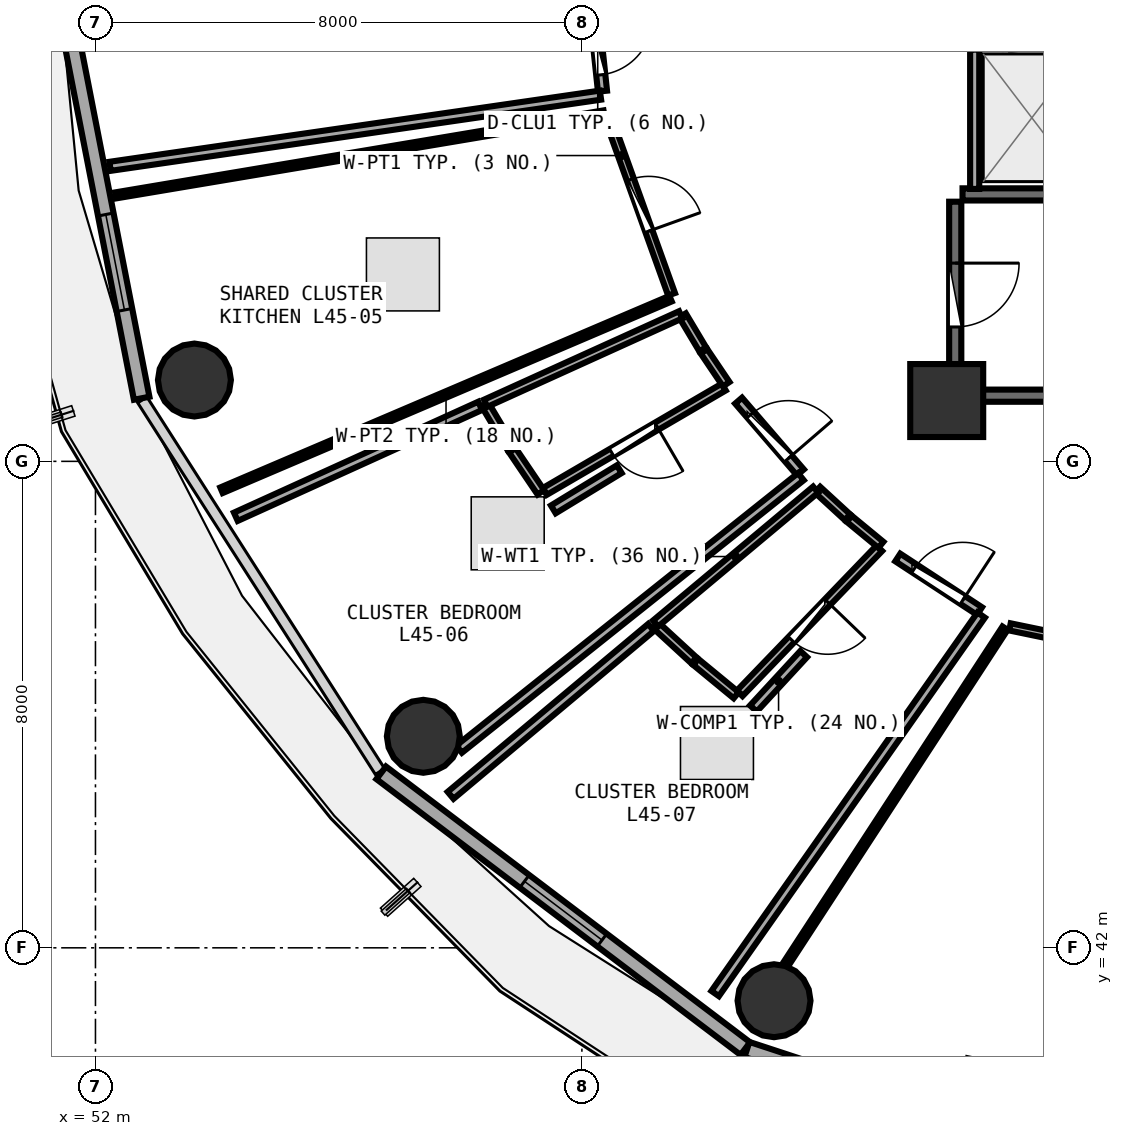
"""IFC4 building model, lengths in metres.
Left out: names, types, materials, properties, quantities, classifications, styles, units other than length and angle.
Written with IfcOpenShell. Run it as: python <this file> out.ifc"""

import sys

from ifc_helpers import new_model, si_unit, direction, frame, frame_2d, origin, origin_2d, place, context, subcontext, project, spatial, rectangle, circle, extrude, element, fill, save


model = new_model("IFC4")
c1 = context("Model", 3, precision=1e-05, world=origin(), true_north=direction((0.0, 1.0)))
c2 = subcontext(c1, "Body", "Model", "MODEL_VIEW")
j1 = project(units=[si_unit("LENGTHUNIT", "METRE"), si_unit("PLANEANGLEUNIT", "RADIAN")], contexts=[c1])
p1 = place(None, origin())
s1 = spatial("IfcSite", under=j1, at=p1, CompositionType="ELEMENT")
p2 = place(p1, origin())
s2 = spatial("IfcBuilding", under=s1, at=p2, CompositionType="ELEMENT")
p3 = place(p2, frame((0.0, 0.0, 176.85)))
s3 = spatial("IfcBuildingStorey", under=s2, at=p3, CompositionType="ELEMENT", Elevation=176.85)
p4 = place(p3, frame((66.0, 51.0, 0.0), z_axis=(0.0, 0.0, 1.0), x_axis=(1.0, 0.0, 0.0)))
e1 = element("IfcColumn", 1, at=p4, inside=s3, PredefinedType="PILASTER", context=c2, shape_type="SweptSolid", body=[
    extrude(rectangle(XDim=1.2, YDim=1.2, at=origin_2d()), origin(), (0.0, 0.0, 1.0), 3.75),
])
for number, where, z_axis, x_axis in (
    (2, (53.627, 51.337, 0.0), (0.0, 0.0, 1.0), (1.0, 0.0, 0.0)),
    (3, (57.392, 45.479, 0.0), (0.0, 0.0, 1.0), (1.0, 0.0, 0.0)),
    (4, (63.16, 41.13, 0.0), (0.0, 0.0, 1.0), (1.0, 0.0, 0.0)),
):
    element("IfcColumn", number, at=place(p3, frame(where, z_axis=z_axis, x_axis=x_axis)), inside=s3, PredefinedType="COLUMN", context=c2, shape_type="SweptSolid", body=[
        extrude(circle(Radius=0.6, at=origin_2d()), origin(), (0.0, 0.0, 1.0), 3.75),
    ])
p5 = place(p3, frame((51.403, 57.985, 0.0), z_axis=(0.0, 0.0, 1.0), x_axis=(0.191716984769, -0.981450252306, 0.0)))
e5 = element("IfcWall", 5, at=p5, inside=s3, PredefinedType="SOLIDWALL", context=c2, shape_type="SweptSolid", body=[
    extrude(rectangle(XDim=7.079, YDim=0.26, at=frame_2d((3.54, 0.0))), origin(), (0.0, 0.0, 1.0), 3.475),
])
p6 = place(p5, frame((4.0, 0.0, 0.85)))
e6 = element("IfcOpeningElement", 6, at=p6, cuts=e5, PredefinedType="OPENING", context=c2, shape_type="SweptSolid", body=[
    extrude(rectangle(XDim=1.6, YDim=1.45, at=frame_2d((0.8, 0.725))), frame((0.0, 0.14, 0.0), z_axis=(0.0, -1.0, 0.0), x_axis=(1.0, 0.0, 0.0)), (0.0, 0.0, 1.0), 0.28),
])
p7 = place(p3, frame((56.699, 44.878, 0.0), z_axis=(0.0, 0.0, 1.0), x_axis=(0.797163719609, -0.603763202042, 0.0)))
e7 = element("IfcWall", 7, at=p7, inside=s3, PredefinedType="SOLIDWALL", context=c2, shape_type="SweptSolid", body=[
    extrude(rectangle(XDim=7.512, YDim=0.26, at=frame_2d((3.756, 0.0))), origin(), (0.0, 0.0, 1.0), 3.475),
])
p8 = place(p7, frame((2.956, 0.0, 0.85)))
e8 = element("IfcOpeningElement", 8, at=p8, cuts=e7, PredefinedType="OPENING", context=c2, shape_type="SweptSolid", body=[
    extrude(rectangle(XDim=1.6, YDim=1.45, at=frame_2d((0.8, 0.725))), frame((0.0, 0.14, 0.0), z_axis=(0.0, -1.0, 0.0), x_axis=(1.0, 0.0, 0.0)), (0.0, 0.0, 1.0), 0.28),
])
p9 = place(p3, frame((62.714, 40.328, 0.0), z_axis=(0.0, 0.0, 1.0), x_axis=(0.950038302428, -0.312133343173, 0.0)))
e9 = element("IfcWall", 9, at=p9, inside=s3, PredefinedType="SOLIDWALL", context=c2, shape_type="SweptSolid", body=[
    extrude(rectangle(XDim=7.733, YDim=0.26, at=frame_2d((3.867, 0.0))), origin(), (0.0, 0.0, 1.0), 3.475),
])
p10 = place(p9, frame((3.067, 0.0, 0.85)))
e10 = element("IfcOpeningElement", 10, at=p10, cuts=e9, PredefinedType="OPENING", context=c2, shape_type="SweptSolid", body=[
    extrude(rectangle(XDim=1.6, YDim=1.45, at=frame_2d((0.8, 0.725))), frame((0.0, 0.14, 0.0), z_axis=(0.0, -1.0, 0.0), x_axis=(1.0, 0.0, 0.0)), (0.0, 0.0, 1.0), 0.28),
])
for number, where, z_axis, x_axis in (
    (11, (66.26, 51.08, 0.0), (0.0, 0.0, 1.0), (1.0, 0.0, 0.0)),
    (12, (73.42, 54.39, 0.0), (0.0, 0.0, 1.0), (-1.0, 0.0, 0.0)),
):
    element("IfcWall", number, at=place(p3, frame(where, z_axis=z_axis, x_axis=x_axis)), inside=s3, PredefinedType="SHEAR", context=c2, shape_type="SweptSolid", body=[
        extrude(rectangle(XDim=7.16, YDim=0.2, at=frame_2d((3.58, 0.0))), origin(), (0.0, 0.0, 1.0), 3.49),
    ])
p11 = place(p3, frame((66.14, 54.27, 0.0), z_axis=(0.0, 0.0, 1.0), x_axis=(0.0, -1.0, 0.0)))
e13 = element("IfcWall", 13, at=p11, inside=s3, PredefinedType="SHEAR", context=c2, shape_type="SweptSolid", body=[
    extrude(rectangle(XDim=3.07, YDim=0.2, at=frame_2d((1.535, 0.0))), origin(), (0.0, 0.0, 1.0), 3.49),
])
p12 = place(p11, frame((1.01, 0.0, 0.0)))
e14 = element("IfcOpeningElement", 14, at=p12, cuts=e13, PredefinedType="OPENING", context=c2, shape_type="SweptSolid", body=[
    extrude(rectangle(XDim=1.05, YDim=2.1, at=frame_2d((0.525, 1.05))), frame((0.0, 0.11, 0.0), z_axis=(0.0, -1.0, 0.0), x_axis=(1.0, 0.0, 0.0)), (0.0, 0.0, 1.0), 0.22),
])
p13 = place(p3, frame((66.46, 54.48, 0.0), z_axis=(0.0, 0.0, 1.0), x_axis=(0.0, 1.0, 0.0)))
e15 = element("IfcWall", 15, at=p13, inside=s3, PredefinedType="PARTITIONING", context=c2, shape_type="SweptSolid", body=[
    extrude(rectangle(XDim=2.29, YDim=0.15, at=frame_2d((1.145, 0.0))), origin(), (0.0, 0.0, 1.0), 3.48),
])
p14 = place(p3, frame((67.04, 47.278, 0.0), z_axis=(0.0, 0.0, 1.0), x_axis=(0.979184226645, -0.202973521154, 0.0)))
e16 = element("IfcWall", 16, at=p14, inside=s3, PredefinedType="PARTITIONING", context=c2, shape_type="SweptSolid", body=[
    extrude(rectangle(XDim=8.162, YDim=0.12, at=frame_2d((4.081, 0.0))), origin(), (0.0, 0.0, 1.0), 2.975),
])
p15 = place(p14, frame((3.631, 0.0, 0.0)))
e17 = element("IfcOpeningElement", 17, at=p15, cuts=e16, PredefinedType="OPENING", context=c2, shape_type="SweptSolid", body=[
    extrude(rectangle(XDim=0.9, YDim=2.08, at=frame_2d((0.45, 1.04))), frame((0.0, 0.07, 0.0), z_axis=(0.0, -1.0, 0.0), x_axis=(1.0, 0.0, 0.0)), (0.0, 0.0, 1.0), 0.14),
])
p16 = place(p3, frame((60.182, 57.568, 0.0), z_axis=(0.0, 0.0, 1.0), x_axis=(0.104940843895, -0.994478465972, 0.0)))
e18 = element("IfcWall", 18, at=p16, inside=s3, PredefinedType="PARTITIONING", context=c2, shape_type="SweptSolid", body=[
    extrude(rectangle(XDim=1.489, YDim=0.15, at=frame_2d((0.745, 0.0))), origin(), (0.0, 0.0, 1.0), 3.48),
])
p17 = place(p16, frame((0.269, 0.0, 0.0)))
e19 = element("IfcOpeningElement", 19, at=p17, cuts=e18, PredefinedType="OPENING", context=c2, shape_type="SweptSolid", body=[
    extrude(rectangle(XDim=0.95, YDim=2.08, at=frame_2d((0.475, 1.04))), frame((0.0, 0.085, 0.0), z_axis=(0.0, -1.0, 0.0), x_axis=(1.0, 0.0, 0.0)), (0.0, 0.0, 1.0), 0.17),
])
p18 = place(p3, frame((60.423, 55.673, 0.0), z_axis=(0.0, 0.0, 1.0), x_axis=(0.338221551274, -0.941066513193, 0.0)))
e20 = element("IfcWall", 20, at=p18, inside=s3, PredefinedType="PARTITIONING", context=c2, shape_type="SweptSolid", body=[
    extrude(rectangle(XDim=3.108, YDim=0.12, at=frame_2d((1.554, 0.0))), origin(), (0.0, 0.0, 1.0), 3.235),
])
p19 = place(p18, frame((1.104, 0.0, 0.0)))
e21 = element("IfcOpeningElement", 21, at=p19, cuts=e20, PredefinedType="OPENING", context=c2, shape_type="SweptSolid", body=[
    extrude(rectangle(XDim=0.9, YDim=2.08, at=frame_2d((0.45, 1.04))), frame((0.0, 0.07, 0.0), z_axis=(0.0, -1.0, 0.0), x_axis=(1.0, 0.0, 0.0)), (0.0, 0.0, 1.0), 0.14),
])
p20 = place(p3, frame((62.333, 51.222, 0.0), z_axis=(0.0, 0.0, 1.0), x_axis=(-0.863869779697, -0.503715201008, 0.0)))
e22 = element("IfcWall", 22, at=p20, inside=s3, PredefinedType="PLUMBINGWALL", context=c2, shape_type="SweptSolid", body=[
    extrude(rectangle(XDim=3.41, YDim=0.13, at=frame_2d((1.705, 0.0))), origin(), (0.0, 0.0, 1.0), 2.975),
])
p21 = place(p20, frame((1.275, 0.0, 0.0)))
e23 = element("IfcOpeningElement", 23, at=p21, cuts=e22, PredefinedType="OPENING", context=c2, shape_type="SweptSolid", body=[
    extrude(rectangle(XDim=0.86, YDim=2.05, at=frame_2d((0.43, 1.025))), frame((0.0, 0.075, 0.0), z_axis=(0.0, -1.0, 0.0), x_axis=(1.0, 0.0, 0.0)), (0.0, 0.0, 1.0), 0.15),
])
p22 = place(p3, frame((62.577, 50.999, 0.0), z_axis=(0.0, 0.0, 1.0), x_axis=(0.652725635782, -0.757594379859, 0.0)))
e24 = element("IfcWall", 24, at=p22, inside=s3, PredefinedType="PARTITIONING", context=c2, shape_type="SweptSolid", body=[
    extrude(rectangle(XDim=1.557, YDim=0.15, at=frame_2d((0.779, 0.0))), origin(), (0.0, 0.0, 1.0), 2.975),
])
p23 = place(p22, frame((0.304, 0.0, 0.0)))
e25 = element("IfcOpeningElement", 25, at=p23, cuts=e24, PredefinedType="OPENING", context=c2, shape_type="SweptSolid", body=[
    extrude(rectangle(XDim=0.95, YDim=2.08, at=frame_2d((0.475, 1.04))), frame((0.0, 0.085, 0.0), z_axis=(0.0, -1.0, 0.0), x_axis=(1.0, 0.0, 0.0)), (0.0, 0.0, 1.0), 0.17),
])
p24 = place(p3, frame((64.891, 48.571, 0.0), z_axis=(0.0, 0.0, 1.0), x_axis=(-0.69341503006, -0.720538407086, 0.0)))
e26 = element("IfcWall", 26, at=p24, inside=s3, PredefinedType="PLUMBINGWALL", context=c2, shape_type="SweptSolid", body=[
    extrude(rectangle(XDim=3.312, YDim=0.13, at=frame_2d((1.656, 0.0))), origin(), (0.0, 0.0, 1.0), 3.175),
])
p25 = place(p24, frame((1.226, 0.0, 0.0)))
e27 = element("IfcOpeningElement", 27, at=p25, cuts=e26, PredefinedType="OPENING", context=c2, shape_type="SweptSolid", body=[
    extrude(rectangle(XDim=0.86, YDim=2.05, at=frame_2d((0.43, 1.025))), frame((0.0, 0.075, 0.0), z_axis=(0.0, -1.0, 0.0), x_axis=(1.0, 0.0, 0.0)), (0.0, 0.0, 1.0), 0.15),
])
p26 = place(p3, frame((65.195, 48.419, 0.0), z_axis=(0.0, 0.0, 1.0), x_axis=(0.836324272787, -0.548235087118, 0.0)))
e28 = element("IfcWall", 28, at=p26, inside=s3, PredefinedType="PARTITIONING", context=c2, shape_type="SweptSolid", body=[
    extrude(rectangle(XDim=1.608, YDim=0.15, at=frame_2d((0.804, 0.0))), origin(), (0.0, 0.0, 1.0), 2.975),
])
p27 = place(p26, frame((0.329, 0.0, 0.0)))
e29 = element("IfcOpeningElement", 29, at=p27, cuts=e28, PredefinedType="OPENING", context=c2, shape_type="SweptSolid", body=[
    extrude(rectangle(XDim=0.95, YDim=2.08, at=frame_2d((0.475, 1.04))), frame((0.0, 0.085, 0.0), z_axis=(0.0, -1.0, 0.0), x_axis=(1.0, 0.0, 0.0)), (0.0, 0.0, 1.0), 0.17),
])
p28 = place(p3, frame((63.351, 41.725, 0.0), z_axis=(0.0, 0.0, 1.0), x_axis=(0.546294843463, 0.837592946487, 0.0)))
e30 = element("IfcWall", 30, at=p28, inside=s3, PredefinedType="PARTITIONING", context=c2, shape_type="SweptSolid", body=[
    extrude(rectangle(XDim=6.604, YDim=0.1, at=frame_2d((3.302, 0.0))), origin(), (0.0, 0.0, 1.0), 2.975),
])
p29 = place(p3, frame((60.305, 56.022, 0.0), z_axis=(0.0, 0.0, 1.0), x_axis=(-0.989635565405, -0.143601698061, 0.0)))
e31 = element("IfcWall", 31, at=p29, inside=s3, PredefinedType="PARTITIONING", context=c2, shape_type="SweptSolid", body=[
    extrude(rectangle(XDim=8.15, YDim=0.15, at=frame_2d((4.075, 0.0))), origin(), (0.0, 0.0, 1.0), 3.025),
])
p30 = place(p3, frame((61.458, 52.675, 0.0), z_axis=(0.0, 0.0, 1.0), x_axis=(-0.919801141081, -0.392384837713, 0.0)))
e32 = element("IfcWall", 32, at=p30, inside=s3, PredefinedType="PARTITIONING", context=c2, shape_type="SweptSolid", body=[
    extrude(rectangle(XDim=8.03, YDim=0.1, at=frame_2d((4.015, 0.0))), origin(), (0.0, 0.0, 1.0), 2.975),
])
p31 = place(p3, frame((52.331, 54.374, 0.0), z_axis=(0.0, 0.0, 1.0), x_axis=(0.986190638786, 0.165614081438, 0.0)))
e33 = element("IfcWall", 33, at=p31, inside=s3, PredefinedType="PARTITIONING", context=c2, shape_type="SweptSolid", body=[
    extrude(rectangle(XDim=8.145, YDim=0.1, at=frame_2d((4.072, 0.0))), origin(), (0.0, 0.0, 1.0), 3.025),
])
p32 = place(p3, frame((61.653, 52.401, 0.0), z_axis=(0.0, 0.0, 1.0), x_axis=(0.513279564627, -0.858221468233, 0.0)))
e34 = element("IfcWall", 34, at=p32, inside=s3, PredefinedType="PLUMBINGWALL", context=c2, shape_type="SweptSolid", body=[
    extrude(rectangle(XDim=0.65, YDim=0.13, at=frame_2d((0.325, 0.0))), origin(), (0.0, 0.0, 1.0), 3.48),
])
p33 = place(p3, frame((62.008, 51.809, 0.0), z_axis=(0.0, 0.0, 1.0), x_axis=(0.559954578189, -0.828523307074, 0.0)))
e35 = element("IfcWall", 35, at=p33, inside=s3, PredefinedType="PLUMBINGWALL", context=c2, shape_type="SweptSolid", body=[
    extrude(rectangle(XDim=0.653, YDim=0.13, at=frame_2d((0.326, 0.0))), origin(), (0.0, 0.0, 1.0), 2.975),
])
p34 = place(p3, frame((59.325, 49.49, 0.0), z_axis=(0.0, 0.0, 1.0), x_axis=(-0.560686624686, 0.828028084607, 0.0)))
e36 = element("IfcWall", 36, at=p34, inside=s3, PredefinedType="PLUMBINGWALL", context=c2, shape_type="SweptSolid", body=[
    extrude(rectangle(XDim=0.836, YDim=0.13, at=frame_2d((0.418, 0.0))), origin(), (0.0, 0.0, 1.0), 3.48),
])
p35 = place(p3, frame((58.835, 50.216, 0.0), z_axis=(0.0, 0.0, 1.0), x_axis=(-0.512289710711, 0.858812699196, 0.0)))
e37 = element("IfcWall", 37, at=p35, inside=s3, PredefinedType="PLUMBINGWALL", context=c2, shape_type="SweptSolid", body=[
    extrude(rectangle(XDim=0.831, YDim=0.13, at=frame_2d((0.415, 0.0))), origin(), (0.0, 0.0, 1.0), 3.48),
])
p36 = place(p3, frame((58.417, 50.955, 0.0), z_axis=(0.0, 0.0, 1.0), x_axis=(0.910753048359, 0.412951431654, 0.0)))
e38 = element("IfcWall", 38, at=p36, inside=s3, PredefinedType="PLUMBINGWALL", context=c2, shape_type="SweptSolid", body=[
    extrude(rectangle(XDim=3.522, YDim=0.13, at=frame_2d((1.761, 0.0))), origin(), (0.0, 0.0, 1.0), 2.975),
])
p37 = place(p3, frame((63.602, 49.748, 0.0), z_axis=(0.0, 0.0, 1.0), x_axis=(-0.781921185322, -0.623377301435, 0.0)))
e39 = element("IfcWall", 39, at=p37, inside=s3, PredefinedType="PARTITIONING", context=c2, shape_type="SweptSolid", body=[
    extrude(rectangle(XDim=7.19, YDim=0.15, at=frame_2d((3.595, 0.0))), origin(), (0.0, 0.0, 1.0), 2.975),
])
p38 = place(p3, frame((54.308, 49.088, 0.0), z_axis=(0.0, 0.0, 1.0), x_axis=(0.910561522486, 0.413373576524, 0.0)))
e40 = element("IfcWall", 40, at=p38, inside=s3, PredefinedType="PARTITIONING", context=c2, shape_type="SweptSolid", body=[
    extrude(rectangle(XDim=4.413, YDim=0.15, at=frame_2d((2.207, 0.0))), origin(), (0.0, 0.0, 1.0), 3.025),
])
p39 = place(p3, frame((59.53, 49.21, 0.0), z_axis=(0.0, 0.0, 1.0), x_axis=(0.853704464487, 0.520757801012, 0.0)))
e41 = element("IfcWall", 41, at=p39, inside=s3, PredefinedType="PARTITIONING", context=c2, shape_type="SweptSolid", body=[
    extrude(rectangle(XDim=1.27, YDim=0.15, at=frame_2d((0.635, 0.0))), origin(), (0.0, 0.0, 1.0), 3.175),
])
p40 = place(p3, frame((63.875, 49.534, 0.0), z_axis=(0.0, 0.0, 1.0), x_axis=(0.736047371117, -0.676930031444, 0.0)))
e42 = element("IfcWall", 42, at=p40, inside=s3, PredefinedType="PLUMBINGWALL", context=c2, shape_type="SweptSolid", body=[
    extrude(rectangle(XDim=0.669, YDim=0.13, at=frame_2d((0.334, 0.0))), origin(), (0.0, 0.0, 1.0), 2.975),
])
p41 = place(p3, frame((64.397, 49.055, 0.0), z_axis=(0.0, 0.0, 1.0), x_axis=(0.771595512941, -0.636113483908, 0.0)))
e43 = element("IfcWall", 43, at=p41, inside=s3, PredefinedType="PLUMBINGWALL", context=c2, shape_type="SweptSolid", body=[
    extrude(rectangle(XDim=0.674, YDim=0.13, at=frame_2d((0.337, 0.0))), origin(), (0.0, 0.0, 1.0), 3.48),
])
p42 = place(p3, frame((62.538, 46.154, 0.0), z_axis=(0.0, 0.0, 1.0), x_axis=(-0.772085608201, 0.635518539154, 0.0)))
e44 = element("IfcWall", 44, at=p42, inside=s3, PredefinedType="PLUMBINGWALL", context=c2, shape_type="SweptSolid", body=[
    extrude(rectangle(XDim=0.862, YDim=0.13, at=frame_2d((0.431, 0.0))), origin(), (0.0, 0.0, 1.0), 3.175),
])
p43 = place(p3, frame((61.842, 46.728, 0.0), z_axis=(0.0, 0.0, 1.0), x_axis=(-0.735982119843, 0.67700097435, 0.0)))
e45 = element("IfcWall", 45, at=p43, inside=s3, PredefinedType="PLUMBINGWALL", context=c2, shape_type="SweptSolid", body=[
    extrude(rectangle(XDim=0.857, YDim=0.13, at=frame_2d((0.428, 0.0))), origin(), (0.0, 0.0, 1.0), 3.175),
])
p44 = place(p3, frame((61.212, 47.334, 0.0), z_axis=(0.0, 0.0, 1.0), x_axis=(0.767100423645, 0.641527037656, 0.0)))
e46 = element("IfcWall", 46, at=p44, inside=s3, PredefinedType="PLUMBINGWALL", context=c2, shape_type="SweptSolid", body=[
    extrude(rectangle(XDim=3.432, YDim=0.13, at=frame_2d((1.716, 0.0))), origin(), (0.0, 0.0, 1.0), 2.975),
])
p45 = place(p3, frame((66.567, 47.472, 0.0), z_axis=(0.0, 0.0, 1.0), x_axis=(-0.575029116879, -0.818132944417, 0.0)))
e47 = element("IfcWall", 47, at=p45, inside=s3, PredefinedType="PARTITIONING", context=c2, shape_type="SweptSolid", body=[
    extrude(rectangle(XDim=7.608, YDim=0.15, at=frame_2d((3.804, 0.0))), origin(), (0.0, 0.0, 1.0), 2.975),
])
p46 = place(p3, frame((57.841, 44.508, 0.0), z_axis=(0.0, 0.0, 1.0), x_axis=(0.766673820116, 0.642036800774, 0.0)))
e48 = element("IfcWall", 48, at=p46, inside=s3, PredefinedType="PARTITIONING", context=c2, shape_type="SweptSolid", body=[
    extrude(rectangle(XDim=4.3, YDim=0.15, at=frame_2d((2.15, 0.0))), origin(), (0.0, 0.0, 1.0), 3.025),
])
p47 = place(p3, frame((62.821, 45.935, 0.0), z_axis=(0.0, 0.0, 1.0), x_axis=(0.678404878428, 0.734688247439, 0.0)))
e49 = element("IfcWall", 49, at=p47, inside=s3, PredefinedType="PARTITIONING", context=c2, shape_type="SweptSolid", body=[
    extrude(rectangle(XDim=1.219, YDim=0.15, at=frame_2d((0.609, 0.0))), origin(), (0.0, 0.0, 1.0), 3.175),
])
p48 = place(p6, origin())
e50 = element("IfcWindow", 50, at=p48, inside=s3, PartitioningType="SINGLE_PANEL", PredefinedType="WINDOW", context=c2, shape_type="SweptSolid", body=[
    extrude(rectangle(XDim=1.6, YDim=1.45, at=frame_2d((0.8, 0.725))), frame((0.0, 0.03, 0.0), z_axis=(0.0, -1.0, 0.0), x_axis=(1.0, 0.0, 0.0)), (0.0, 0.0, 1.0), 0.06),
])
fill(e6, e50)
p49 = place(p8, origin())
e51 = element("IfcWindow", 51, at=p49, inside=s3, PartitioningType="SINGLE_PANEL", PredefinedType="WINDOW", context=c2, shape_type="SweptSolid", body=[
    extrude(rectangle(XDim=1.6, YDim=1.45, at=frame_2d((0.8, 0.725))), frame((0.0, 0.03, 0.0), z_axis=(0.0, -1.0, 0.0), x_axis=(1.0, 0.0, 0.0)), (0.0, 0.0, 1.0), 0.06),
])
fill(e8, e51)
p50 = place(p12, origin())
e52 = element("IfcDoor", 52, at=p50, inside=s3, OperationType="SINGLE_SWING_LEFT", PredefinedType="DOOR", context=c2, shape_type="SweptSolid", body=[
    extrude(rectangle(XDim=1.05, YDim=2.1, at=frame_2d((0.525, 1.05))), frame((0.0, 0.025, 0.0), z_axis=(0.0, -1.0, 0.0), x_axis=(1.0, 0.0, 0.0)), (0.0, 0.0, 1.0), 0.05),
])
fill(e14, e52)
p51 = place(p17, origin())
e53 = element("IfcDoor", 53, at=p51, inside=s3, OperationType="SINGLE_SWING_LEFT", PredefinedType="DOOR", context=c2, shape_type="SweptSolid", body=[
    extrude(rectangle(XDim=0.95, YDim=2.08, at=frame_2d((0.475, 1.04))), frame((0.0, 0.025, 0.0), z_axis=(0.0, -1.0, 0.0), x_axis=(1.0, 0.0, 0.0)), (0.0, 0.0, 1.0), 0.05),
])
fill(e19, e53)
p52 = place(p19, origin())
e54 = element("IfcDoor", 54, at=p52, inside=s3, OperationType="SINGLE_SWING_RIGHT", PredefinedType="DOOR", context=c2, shape_type="SweptSolid", body=[
    extrude(rectangle(XDim=0.9, YDim=2.08, at=frame_2d((0.45, 1.04))), frame((0.0, 0.025, 0.0), z_axis=(0.0, -1.0, 0.0), x_axis=(1.0, 0.0, 0.0)), (0.0, 0.0, 1.0), 0.05),
])
fill(e21, e54)
p53 = place(p21, origin())
e55 = element("IfcDoor", 55, at=p53, inside=s3, OperationType="SINGLE_SWING_LEFT", PredefinedType="DOOR", context=c2, shape_type="SweptSolid", body=[
    extrude(rectangle(XDim=0.86, YDim=2.05, at=frame_2d((0.43, 1.025))), frame((0.0, 0.025, 0.0), z_axis=(0.0, -1.0, 0.0), x_axis=(1.0, 0.0, 0.0)), (0.0, 0.0, 1.0), 0.05),
])
fill(e23, e55)
p54 = place(p23, origin())
e56 = element("IfcDoor", 56, at=p54, inside=s3, OperationType="SINGLE_SWING_RIGHT", PredefinedType="DOOR", context=c2, shape_type="SweptSolid", body=[
    extrude(rectangle(XDim=0.95, YDim=2.08, at=frame_2d((0.475, 1.04))), frame((0.0, 0.025, 0.0), z_axis=(0.0, -1.0, 0.0), x_axis=(1.0, 0.0, 0.0)), (0.0, 0.0, 1.0), 0.05),
])
fill(e25, e56)
p55 = place(p25, origin())
e57 = element("IfcDoor", 57, at=p55, inside=s3, OperationType="SINGLE_SWING_LEFT", PredefinedType="DOOR", context=c2, shape_type="SweptSolid", body=[
    extrude(rectangle(XDim=0.86, YDim=2.05, at=frame_2d((0.43, 1.025))), frame((0.0, 0.025, 0.0), z_axis=(0.0, -1.0, 0.0), x_axis=(1.0, 0.0, 0.0)), (0.0, 0.0, 1.0), 0.05),
])
fill(e27, e57)
p56 = place(p27, origin())
e58 = element("IfcDoor", 58, at=p56, inside=s3, OperationType="SINGLE_SWING_RIGHT", PredefinedType="DOOR", context=c2, shape_type="SweptSolid", body=[
    extrude(rectangle(XDim=0.95, YDim=2.08, at=frame_2d((0.475, 1.04))), frame((0.0, 0.025, 0.0), z_axis=(0.0, -1.0, 0.0), x_axis=(1.0, 0.0, 0.0)), (0.0, 0.0, 1.0), 0.05),
])
fill(e29, e58)
save(model, sys.argv[1])
